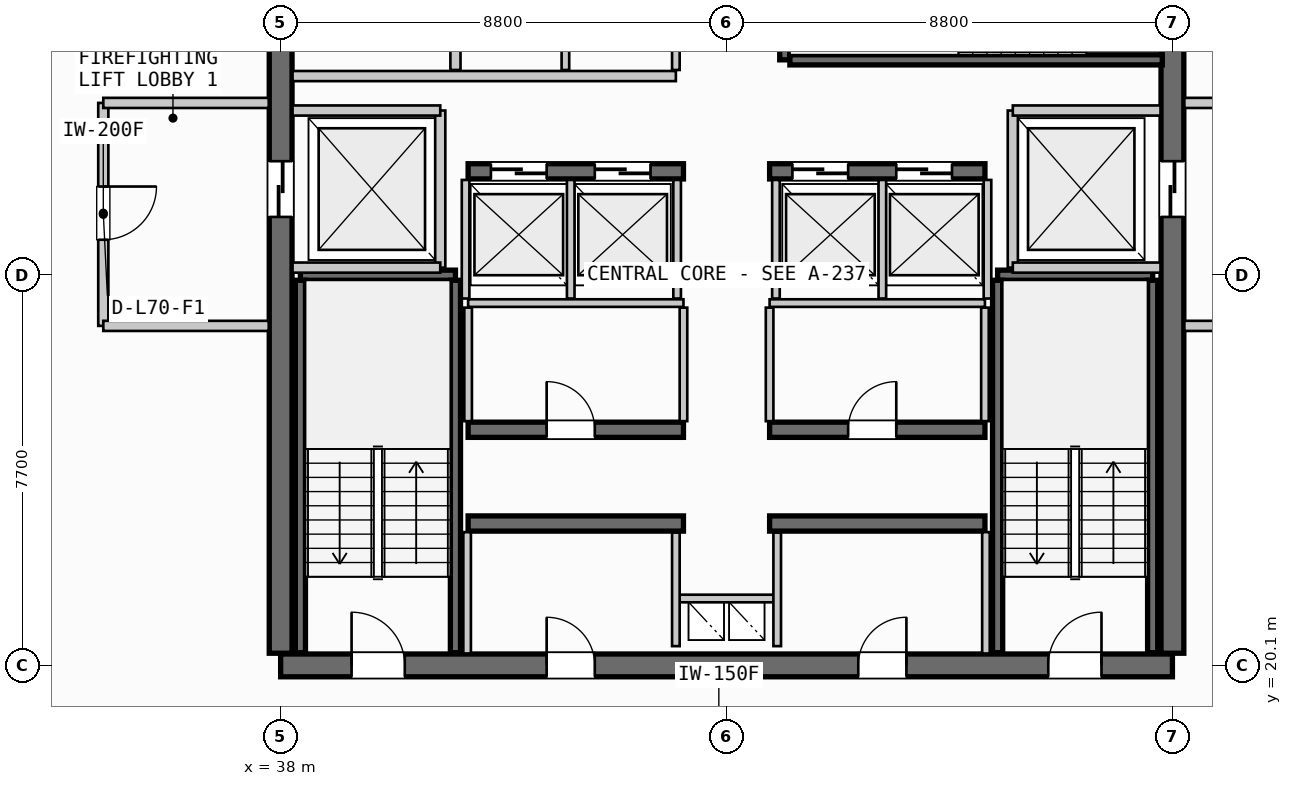
"""IFC4 building model, lengths in metres.
Left out: names, types, materials, properties, quantities, classifications, styles, units other than length and angle.
Written with IfcOpenShell. Run it as: python <this file> out.ifc"""

import sys

from ifc_helpers import new_model, si_unit, direction, frame, frame_2d, origin, place, context, subcontext, project, spatial, rectangle, extrude, source, transform, mapped, element, fill, save


model = new_model("IFC4")
c1 = context("Model", 3, precision=1e-05, world=origin(), true_north=direction((0.0, 1.0)))
c2 = subcontext(c1, "Body", "Model", "MODEL_VIEW")
j1 = project(units=[si_unit("LENGTHUNIT", "METRE"), si_unit("PLANEANGLEUNIT", "RADIAN")], contexts=[c1])
p1 = place(None, origin())
s1 = spatial("IfcSite", under=j1, at=p1, CompositionType="ELEMENT")
p2 = place(p1, origin())
s2 = spatial("IfcBuilding", under=s1, at=p2, CompositionType="ELEMENT")
p3 = place(p2, frame((0.0, 0.0, 266.35)))
s3 = spatial("IfcBuildingStorey", under=s2, at=p3, CompositionType="ELEMENT", Elevation=266.35)
p4 = place(p3, frame((38.0, 20.1, 0.0), z_axis=(0.0, 0.0, 1.0), x_axis=(1.0, 0.0, 0.0)))
e1 = element("IfcWall", 1, at=p4, inside=s3, PredefinedType="SHEAR", context=c2, shape_type="SweptSolid", body=[
    extrude(rectangle(XDim=17.6, YDim=0.45, at=frame_2d((8.8, 0.0))), origin(), (0.0, 0.0, 1.0), 3.21),
])
p5 = place(p4, frame((1.4, 0.0, 0.0)))
e2 = element("IfcOpeningElement", 2, at=p5, cuts=e1, PredefinedType="OPENING", context=c2, shape_type="SweptSolid", body=[
    extrude(rectangle(XDim=1.05, YDim=2.15, at=frame_2d((0.525, 1.075))), frame((0.0, 0.235, 0.0), z_axis=(0.0, -1.0, 0.0), x_axis=(1.0, 0.0, 0.0)), (0.0, 0.0, 1.0), 0.47),
])
p6 = place(p4, frame((15.15, 0.0, 0.0)))
e3 = element("IfcOpeningElement", 3, at=p6, cuts=e1, PredefinedType="OPENING", context=c2, shape_type="SweptSolid", body=[
    extrude(rectangle(XDim=1.05, YDim=2.15, at=frame_2d((0.525, 1.075))), frame((0.0, 0.235, 0.0), z_axis=(0.0, -1.0, 0.0), x_axis=(1.0, 0.0, 0.0)), (0.0, 0.0, 1.0), 0.47),
])
p7 = place(p4, frame((5.25, 0.0, 0.0)))
e4 = element("IfcOpeningElement", 4, at=p7, cuts=e1, PredefinedType="OPENING", context=c2, shape_type="SweptSolid", body=[
    extrude(rectangle(XDim=0.95, YDim=2.15, at=frame_2d((0.475, 1.075))), frame((0.0, 0.235, 0.0), z_axis=(0.0, -1.0, 0.0), x_axis=(1.0, 0.0, 0.0)), (0.0, 0.0, 1.0), 0.47),
])
p8 = place(p4, frame((11.4, 0.0, 0.0)))
e5 = element("IfcOpeningElement", 5, at=p8, cuts=e1, PredefinedType="OPENING", context=c2, shape_type="SweptSolid", body=[
    extrude(rectangle(XDim=0.95, YDim=2.15, at=frame_2d((0.475, 1.075))), frame((0.0, 0.235, 0.0), z_axis=(0.0, -1.0, 0.0), x_axis=(1.0, 0.0, 0.0)), (0.0, 0.0, 1.0), 0.47),
])
p9 = place(p3, frame((38.0, 35.26, 0.0), z_axis=(0.0, 0.0, 1.0), x_axis=(0.0, -1.0, 0.0)))
e6 = element("IfcWall", 6, at=p9, inside=s3, PredefinedType="SHEAR", context=c2, shape_type="SweptSolid", body=[
    extrude(rectangle(XDim=14.92, YDim=0.45, at=frame_2d((7.46, 0.0))), origin(), (0.0, 0.0, 1.0), 3.21),
])
p10 = place(p9, frame((5.21, 0.0, 0.0)))
e7 = element("IfcOpeningElement", 7, at=p10, cuts=e6, PredefinedType="OPENING", context=c2, shape_type="SweptSolid", body=[
    extrude(rectangle(XDim=1.1, YDim=2.2, at=frame_2d((0.55, 1.1))), frame((0.0, 0.235, 0.0), z_axis=(0.0, -1.0, 0.0), x_axis=(1.0, 0.0, 0.0)), (0.0, 0.0, 1.0), 0.47),
])
p11 = place(p3, frame((55.6, 20.34, 0.0), z_axis=(0.0, 0.0, 1.0), x_axis=(0.0, 1.0, 0.0)))
e8 = element("IfcWall", 8, at=p11, inside=s3, PredefinedType="SHEAR", context=c2, shape_type="SweptSolid", body=[
    extrude(rectangle(XDim=14.92, YDim=0.45, at=frame_2d((7.46, 0.0))), origin(), (0.0, 0.0, 1.0), 3.21),
])
p12 = place(p11, frame((12.71, 0.0, 0.0)))
e9 = element("IfcOpeningElement", 9, at=p12, cuts=e8, PredefinedType="OPENING", context=c2, shape_type="SweptSolid", body=[
    extrude(rectangle(XDim=1.05, YDim=2.15, at=frame_2d((0.525, 1.075))), frame((0.0, 0.235, 0.0), z_axis=(0.0, -1.0, 0.0), x_axis=(1.0, 0.0, 0.0)), (0.0, 0.0, 1.0), 0.47),
])
p13 = place(p11, frame((8.61, 0.0, 0.0)))
e10 = element("IfcOpeningElement", 10, at=p13, cuts=e8, PredefinedType="OPENING", context=c2, shape_type="SweptSolid", body=[
    extrude(rectangle(XDim=1.1, YDim=2.2, at=frame_2d((0.55, 1.1))), frame((0.0, 0.235, 0.0), z_axis=(0.0, -1.0, 0.0), x_axis=(1.0, 0.0, 0.0)), (0.0, 0.0, 1.0), 0.47),
])
for number, where, z_axis, x_axis in (
    (11, (41.7, 22.9, 0.0), (0.0, 0.0, 1.0), (1.0, 0.0, 0.0)),
    (12, (47.65, 22.9, 0.0), (0.0, 0.0, 1.0), (1.0, 0.0, 0.0)),
):
    element("IfcWall", number, at=place(p3, frame(where, z_axis=z_axis, x_axis=x_axis)), inside=s3, PredefinedType="SHEAR", context=c2, shape_type="SweptSolid", body=[
        extrude(rectangle(XDim=4.25, YDim=0.3, at=frame_2d((2.125, 0.0))), origin(), (0.0, 0.0, 1.0), 3.21),
    ])
p14 = place(p3, frame((41.7, 24.75, 0.0), z_axis=(0.0, 0.0, 1.0), x_axis=(1.0, 0.0, 0.0)))
e13 = element("IfcWall", 13, at=p14, inside=s3, PredefinedType="SHEAR", context=c2, shape_type="SweptSolid", body=[
    extrude(rectangle(XDim=4.25, YDim=0.3, at=frame_2d((2.125, 0.0))), origin(), (0.0, 0.0, 1.0), 3.21),
])
p15 = place(p14, frame((1.55, 0.0, 0.0)))
e14 = element("IfcOpeningElement", 14, at=p15, cuts=e13, PredefinedType="OPENING", context=c2, shape_type="SweptSolid", body=[
    extrude(rectangle(XDim=0.95, YDim=2.15, at=frame_2d((0.475, 1.075))), frame((0.0, 0.16, 0.0), z_axis=(0.0, -1.0, 0.0), x_axis=(1.0, 0.0, 0.0)), (0.0, 0.0, 1.0), 0.32),
])
p16 = place(p3, frame((47.65, 24.75, 0.0), z_axis=(0.0, 0.0, 1.0), x_axis=(1.0, 0.0, 0.0)))
e15 = element("IfcWall", 15, at=p16, inside=s3, PredefinedType="SHEAR", context=c2, shape_type="SweptSolid", body=[
    extrude(rectangle(XDim=4.25, YDim=0.3, at=frame_2d((2.125, 0.0))), origin(), (0.0, 0.0, 1.0), 3.21),
])
p17 = place(p16, frame((1.55, 0.0, 0.0)))
e16 = element("IfcOpeningElement", 16, at=p17, cuts=e15, PredefinedType="OPENING", context=c2, shape_type="SweptSolid", body=[
    extrude(rectangle(XDim=0.95, YDim=2.15, at=frame_2d((0.475, 1.075))), frame((0.0, 0.16, 0.0), z_axis=(0.0, -1.0, 0.0), x_axis=(1.0, 0.0, 0.0)), (0.0, 0.0, 1.0), 0.32),
])
p18 = place(p3, frame((41.7, 29.85, 0.0), z_axis=(0.0, 0.0, 1.0), x_axis=(1.0, 0.0, 0.0)))
e17 = element("IfcWall", 17, at=p18, inside=s3, PredefinedType="SHEAR", context=c2, shape_type="SweptSolid", body=[
    extrude(rectangle(XDim=4.25, YDim=0.3, at=frame_2d((2.125, 0.0))), origin(), (0.0, 0.0, 1.0), 3.21),
])
p19 = place(p18, frame((0.45, 0.0, 0.0)))
e18 = element("IfcOpeningElement", 18, at=p19, cuts=e17, PredefinedType="OPENING", context=c2, shape_type="SweptSolid", body=[
    extrude(rectangle(XDim=1.1, YDim=2.2, at=frame_2d((0.55, 1.1))), frame((0.0, 0.16, 0.0), z_axis=(0.0, -1.0, 0.0), x_axis=(1.0, 0.0, 0.0)), (0.0, 0.0, 1.0), 0.32),
])
p20 = place(p18, frame((2.5, 0.0, 0.0)))
e19 = element("IfcOpeningElement", 19, at=p20, cuts=e17, PredefinedType="OPENING", context=c2, shape_type="SweptSolid", body=[
    extrude(rectangle(XDim=1.1, YDim=2.2, at=frame_2d((0.55, 1.1))), frame((0.0, 0.16, 0.0), z_axis=(0.0, -1.0, 0.0), x_axis=(1.0, 0.0, 0.0)), (0.0, 0.0, 1.0), 0.32),
])
p21 = place(p3, frame((47.65, 29.85, 0.0), z_axis=(0.0, 0.0, 1.0), x_axis=(1.0, 0.0, 0.0)))
e20 = element("IfcWall", 20, at=p21, inside=s3, PredefinedType="SHEAR", context=c2, shape_type="SweptSolid", body=[
    extrude(rectangle(XDim=4.25, YDim=0.3, at=frame_2d((2.125, 0.0))), origin(), (0.0, 0.0, 1.0), 3.21),
])
p22 = place(p21, frame((0.45, 0.0, 0.0)))
e21 = element("IfcOpeningElement", 21, at=p22, cuts=e20, PredefinedType="OPENING", context=c2, shape_type="SweptSolid", body=[
    extrude(rectangle(XDim=1.1, YDim=2.2, at=frame_2d((0.55, 1.1))), frame((0.0, 0.16, 0.0), z_axis=(0.0, -1.0, 0.0), x_axis=(1.0, 0.0, 0.0)), (0.0, 0.0, 1.0), 0.32),
])
p23 = place(p21, frame((2.5, 0.0, 0.0)))
e22 = element("IfcOpeningElement", 22, at=p23, cuts=e20, PredefinedType="OPENING", context=c2, shape_type="SweptSolid", body=[
    extrude(rectangle(XDim=1.1, YDim=2.2, at=frame_2d((0.55, 1.1))), frame((0.0, 0.16, 0.0), z_axis=(0.0, -1.0, 0.0), x_axis=(1.0, 0.0, 0.0)), (0.0, 0.0, 1.0), 0.32),
])
p24 = place(p3, frame((38.39, 27.8, 0.0), z_axis=(0.0, 0.0, 1.0), x_axis=(1.0, 0.0, 0.0)))
e23 = element("IfcWall", 23, at=p24, inside=s3, PredefinedType="SHEAR", context=c2, shape_type="SweptSolid", body=[
    extrude(rectangle(XDim=3.06, YDim=0.2, at=frame_2d((1.53, 0.0))), origin(), (0.0, 0.0, 1.0), 3.21),
])
for number, where, z_axis, x_axis in (
    (24, (41.45, 27.7, 0.0), (0.0, 0.0, 1.0), (0.0, -1.0, 0.0)),
    (25, (38.39, 20.35, 0.0), (0.0, 0.0, 1.0), (0.0, 1.0, 0.0)),
):
    element("IfcWall", number, at=place(p3, frame(where, z_axis=z_axis, x_axis=x_axis)), inside=s3, PredefinedType="SHEAR", context=c2, shape_type="SweptSolid", body=[
        extrude(rectangle(XDim=7.35, YDim=0.2, at=frame_2d((3.675, 0.0))), origin(), (0.0, 0.0, 1.0), 3.21),
    ])
p25 = place(p3, frame((52.15, 27.8, 0.0), z_axis=(0.0, 0.0, 1.0), x_axis=(1.0, 0.0, 0.0)))
e26 = element("IfcWall", 26, at=p25, inside=s3, PredefinedType="SHEAR", context=c2, shape_type="SweptSolid", body=[
    extrude(rectangle(XDim=3.06, YDim=0.2, at=frame_2d((1.53, 0.0))), origin(), (0.0, 0.0, 1.0), 3.21),
])
for number, where, z_axis, x_axis in (
    (27, (55.21, 27.7, 0.0), (0.0, 0.0, 1.0), (0.0, -1.0, 0.0)),
    (28, (52.15, 20.35, 0.0), (0.0, 0.0, 1.0), (0.0, 1.0, 0.0)),
):
    element("IfcWall", number, at=place(p3, frame(where, z_axis=z_axis, x_axis=x_axis)), inside=s3, PredefinedType="SHEAR", context=c2, shape_type="SweptSolid", body=[
        extrude(rectangle(XDim=7.35, YDim=0.2, at=frame_2d((3.675, 0.0))), origin(), (0.0, 0.0, 1.0), 3.21),
    ])
p26 = place(p3, frame((47.95, 32.05, 0.0), z_axis=(0.0, 0.0, 1.0), x_axis=(0.0, 1.0, 0.0)))
e29 = element("IfcWall", 29, at=p26, inside=s3, PredefinedType="SHEAR", context=c2, shape_type="SweptSolid", body=[
    extrude(rectangle(XDim=3.06, YDim=0.2, at=frame_2d((1.53, 0.0))), origin(), (0.0, 0.0, 1.0), 3.21),
])
p27 = place(p3, frame((55.4, 32.05, 0.0), z_axis=(0.0, 0.0, 1.0), x_axis=(-1.0, 0.0, 0.0)))
e30 = element("IfcWall", 30, at=p27, inside=s3, PredefinedType="SHEAR", context=c2, shape_type="SweptSolid", body=[
    extrude(rectangle(XDim=7.35, YDim=0.2, at=frame_2d((3.675, 0.0))), origin(), (0.0, 0.0, 1.0), 3.21),
])
p28 = place(p3, frame((45.8, 21.42, 0.0), z_axis=(0.0, 0.0, 1.0), x_axis=(1.0, 0.0, 0.0)))
e31 = element("IfcWall", 31, at=p28, inside=s3, PredefinedType="PARTITIONING", context=c2, shape_type="SweptSolid", body=[
    extrude(rectangle(XDim=2.0, YDim=0.15, at=frame_2d((1.0, 0.0))), origin(), (0.0, 0.0, 1.0), 2.595),
])
for number, where, z_axis, x_axis in (
    (32, (45.8, 20.48, 0.0), (0.0, 0.0, 1.0), (0.0, 1.0, 0.0)),
    (33, (47.8, 20.48, 0.0), (0.0, 0.0, 1.0), (0.0, 1.0, 0.0)),
):
    element("IfcWall", number, at=place(p3, frame(where, z_axis=z_axis, x_axis=x_axis)), inside=s3, PredefinedType="PARTITIONING", context=c2, shape_type="SweptSolid", body=[
        extrude(rectangle(XDim=2.24, YDim=0.15, at=frame_2d((1.12, 0.0))), origin(), (0.0, 0.0, 1.0), 2.595),
    ])
p29 = place(p3, frame((41.15, 27.95, 0.0), z_axis=(0.0, 0.0, 1.0), x_axis=(0.0, 1.0, 0.0)))
e34 = element("IfcWall", 34, at=p29, inside=s3, PredefinedType="PARTITIONING", context=c2, shape_type="SweptSolid", body=[
    extrude(rectangle(XDim=3.1, YDim=0.2, at=frame_2d((1.55, 0.0))), origin(), (0.0, 0.0, 1.0), 2.595),
])
for number, where, z_axis, x_axis in (
    (35, (38.235, 27.95, 0.0), (0.0, 0.0, 1.0), (1.0, 0.0, 0.0)),
    (36, (38.235, 31.05, 0.0), (0.0, 0.0, 1.0), (1.0, 0.0, 0.0)),
):
    element("IfcWall", number, at=place(p3, frame(where, z_axis=z_axis, x_axis=x_axis)), inside=s3, PredefinedType="PARTITIONING", context=c2, shape_type="SweptSolid", body=[
        extrude(rectangle(XDim=2.915, YDim=0.2, at=frame_2d((1.458, 0.0))), origin(), (0.0, 0.0, 1.0), 2.595),
    ])
p30 = place(p3, frame((34.5, 31.2, 0.0), z_axis=(0.0, 0.0, 1.0), x_axis=(0.0, -1.0, 0.0)))
e37 = element("IfcWall", 37, at=p30, inside=s3, PredefinedType="PARTITIONING", context=c2, shape_type="SweptSolid", body=[
    extrude(rectangle(XDim=4.4, YDim=0.2, at=frame_2d((2.2, 0.0))), origin(), (0.0, 0.0, 1.0), 2.595),
])
p31 = place(p30, frame((1.65, 0.0, 0.0)))
e38 = element("IfcOpeningElement", 38, at=p31, cuts=e37, PredefinedType="OPENING", context=c2, shape_type="SweptSolid", body=[
    extrude(rectangle(XDim=1.05, YDim=2.15, at=frame_2d((0.525, 1.075))), frame((0.0, 0.11, 0.0), z_axis=(0.0, -1.0, 0.0), x_axis=(1.0, 0.0, 0.0)), (0.0, 0.0, 1.0), 0.22),
])
for number, where, z_axis, x_axis in (
    (39, (34.5, 26.8, 0.0), (0.0, 0.0, 1.0), (1.0, 0.0, 0.0)),
    (40, (34.5, 31.2, 0.0), (0.0, 0.0, 1.0), (1.0, 0.0, 0.0)),
):
    element("IfcWall", number, at=place(p3, frame(where, z_axis=z_axis, x_axis=x_axis)), inside=s3, PredefinedType="PARTITIONING", context=c2, shape_type="SweptSolid", body=[
        extrude(rectangle(XDim=3.265, YDim=0.2, at=frame_2d((1.632, 0.0))), origin(), (0.0, 0.0, 1.0), 2.595),
    ])
p32 = place(p3, frame((52.45, 27.95, 0.0), z_axis=(0.0, 0.0, 1.0), x_axis=(0.0, 1.0, 0.0)))
e41 = element("IfcWall", 41, at=p32, inside=s3, PredefinedType="PARTITIONING", context=c2, shape_type="SweptSolid", body=[
    extrude(rectangle(XDim=3.1, YDim=0.2, at=frame_2d((1.55, 0.0))), origin(), (0.0, 0.0, 1.0), 2.595),
])
for number, where, z_axis, x_axis in (
    (42, (52.45, 27.95, 0.0), (0.0, 0.0, 1.0), (1.0, 0.0, 0.0)),
    (43, (52.45, 31.05, 0.0), (0.0, 0.0, 1.0), (1.0, 0.0, 0.0)),
):
    element("IfcWall", number, at=place(p3, frame(where, z_axis=z_axis, x_axis=x_axis)), inside=s3, PredefinedType="PARTITIONING", context=c2, shape_type="SweptSolid", body=[
        extrude(rectangle(XDim=2.915, YDim=0.2, at=frame_2d((1.458, 0.0))), origin(), (0.0, 0.0, 1.0), 2.595),
    ])
for number, where, z_axis, x_axis in (
    (44, (55.835, 26.8, 0.0), (0.0, 0.0, 1.0), (1.0, 0.0, 0.0)),
    (45, (55.835, 31.2, 0.0), (0.0, 0.0, 1.0), (1.0, 0.0, 0.0)),
):
    element("IfcWall", number, at=place(p3, frame(where, z_axis=z_axis, x_axis=x_axis)), inside=s3, PredefinedType="PARTITIONING", context=c2, shape_type="SweptSolid", body=[
        extrude(rectangle(XDim=3.265, YDim=0.2, at=frame_2d((1.633, 0.0))), origin(), (0.0, 0.0, 1.0), 2.595),
    ])
for number, where, z_axis, x_axis in (
    (46, (41.68, 20.335, 0.0), (0.0, 0.0, 1.0), (0.0, 1.0, 0.0)),
    (47, (51.92, 20.335, 0.0), (0.0, 0.0, 1.0), (0.0, 1.0, 0.0)),
):
    element("IfcWall", number, at=place(p3, frame(where, z_axis=z_axis, x_axis=x_axis)), inside=s3, PredefinedType="PARTITIONING", context=c2, shape_type="SweptSolid", body=[
        extrude(rectangle(XDim=2.395, YDim=0.15, at=frame_2d((1.198, 0.0))), origin(), (0.0, 0.0, 1.0), 2.595),
    ])
for number, where, z_axis, x_axis in (
    (48, (41.7, 27.25, 0.0), (0.0, 0.0, 1.0), (1.0, 0.0, 0.0)),
    (49, (47.65, 27.25, 0.0), (0.0, 0.0, 1.0), (1.0, 0.0, 0.0)),
):
    element("IfcWall", number, at=place(p3, frame(where, z_axis=z_axis, x_axis=x_axis)), inside=s3, PredefinedType="PARTITIONING", context=c2, shape_type="SweptSolid", body=[
        extrude(rectangle(XDim=4.25, YDim=0.15, at=frame_2d((2.125, 0.0))), origin(), (0.0, 0.0, 1.0), 2.595),
    ])
for number, where, z_axis, x_axis in (
    (50, (41.7, 24.92, 0.0), (0.0, 0.0, 1.0), (0.0, 1.0, 0.0)),
    (51, (45.95, 24.92, 0.0), (0.0, 0.0, 1.0), (0.0, 1.0, 0.0)),
    (52, (47.65, 24.92, 0.0), (0.0, 0.0, 1.0), (0.0, 1.0, 0.0)),
    (53, (51.9, 24.92, 0.0), (0.0, 0.0, 1.0), (0.0, 1.0, 0.0)),
):
    element("IfcWall", number, at=place(p3, frame(where, z_axis=z_axis, x_axis=x_axis)), inside=s3, PredefinedType="PARTITIONING", context=c2, shape_type="SweptSolid", body=[
        extrude(rectangle(XDim=2.24, YDim=0.15, at=frame_2d((1.12, 0.0))), origin(), (0.0, 0.0, 1.0), 2.595),
    ])
for number, where, z_axis, x_axis in (
    (54, (41.65, 27.34, 0.0), (0.0, 0.0, 1.0), (0.0, 1.0, 0.0)),
    (55, (43.725, 27.34, 0.0), (0.0, 0.0, 1.0), (0.0, 1.0, 0.0)),
    (56, (45.825, 27.34, 0.0), (0.0, 0.0, 1.0), (0.0, 1.0, 0.0)),
    (57, (47.775, 27.34, 0.0), (0.0, 0.0, 1.0), (0.0, 1.0, 0.0)),
    (58, (49.875, 27.34, 0.0), (0.0, 0.0, 1.0), (0.0, 1.0, 0.0)),
    (59, (51.95, 27.34, 0.0), (0.0, 0.0, 1.0), (0.0, 1.0, 0.0)),
):
    element("IfcWall", number, at=place(p3, frame(where, z_axis=z_axis, x_axis=x_axis)), inside=s3, PredefinedType="PARTITIONING", context=c2, shape_type="SweptSolid", body=[
        extrude(rectangle(XDim=2.34, YDim=0.15, at=frame_2d((1.17, 0.0))), origin(), (0.0, 0.0, 1.0), 2.595),
    ])
p33 = place(p3, frame((41.45, 31.85, 0.0), z_axis=(0.0, 0.0, 1.0), x_axis=(0.0, 1.0, 0.0)))
e60 = element("IfcWall", 60, at=p33, inside=s3, PredefinedType="PARTITIONING", context=c2, shape_type="SweptSolid", body=[
    extrude(rectangle(XDim=3.415, YDim=0.2, at=frame_2d((1.708, 0.0))), origin(), (0.0, 0.0, 1.0), 2.595),
])
p34 = place(p3, frame((38.235, 31.73, 0.0), z_axis=(0.0, 0.0, 1.0), x_axis=(1.0, 0.0, 0.0)))
e61 = element("IfcWall", 61, at=p34, inside=s3, PredefinedType="PARTITIONING", context=c2, shape_type="SweptSolid", body=[
    extrude(rectangle(XDim=7.565, YDim=0.2, at=frame_2d((3.782, 0.0))), origin(), (0.0, 0.0, 1.0), 2.595),
])
p35 = place(p3, frame((45.8, 31.85, 0.0), z_axis=(0.0, 0.0, 1.0), x_axis=(0.0, 1.0, 0.0)))
e62 = element("IfcWall", 62, at=p35, inside=s3, PredefinedType="PARTITIONING", context=c2, shape_type="SweptSolid", body=[
    extrude(rectangle(XDim=3.415, YDim=0.15, at=frame_2d((1.708, 0.0))), origin(), (0.0, 0.0, 1.0), 2.595),
])
p36 = place(p3, frame((43.62, 31.85, 0.0), z_axis=(0.0, 0.0, 1.0), x_axis=(0.0, 1.0, 0.0)))
e63 = element("IfcWall", 63, at=p36, inside=s3, PredefinedType="PLUMBINGWALL", context=c2, shape_type="SweptSolid", body=[
    extrude(rectangle(XDim=3.415, YDim=0.15, at=frame_2d((1.708, 0.0))), origin(), (0.0, 0.0, 1.0), 2.595),
])
m1 = source(origin(), c2, "Body", "SweptSolid", [
    extrude(rectangle(XDim=1.05, YDim=2.15, at=frame_2d((0.525, 1.075))), frame((0.0, 0.025, 0.0), z_axis=(0.0, -1.0, 0.0), x_axis=(1.0, 0.0, 0.0)), (0.0, 0.0, 1.0), 0.05),
])
p37 = place(p5, origin())
e64 = element("IfcDoor", 64, at=p37, inside=s3, OperationType="SINGLE_SWING_LEFT", PredefinedType="DOOR", context=c2, shape_type="MappedRepresentation", body=[
    mapped(m1, transform((0.0, 0.0, 0.0), scale=1.0)),
])
fill(e2, e64)
p38 = place(p6, origin())
e65 = element("IfcDoor", 65, at=p38, inside=s3, OperationType="SINGLE_SWING_RIGHT", PredefinedType="DOOR", context=c2, shape_type="MappedRepresentation", body=[
    mapped(m1, transform((0.0, 0.0, 0.0), scale=1.0)),
])
fill(e3, e65)
m2 = source(origin(), c2, "Body", "SweptSolid", [
    extrude(rectangle(XDim=1.1, YDim=2.2, at=frame_2d((0.55, 1.1))), frame((0.0, 0.025, 0.0), z_axis=(0.0, -1.0, 0.0), x_axis=(1.0, 0.0, 0.0)), (0.0, 0.0, 1.0), 0.05),
])
p39 = place(p10, origin())
e66 = element("IfcDoor", 66, at=p39, inside=s3, OperationType="SLIDING_TO_LEFT", PredefinedType="DOOR", context=c2, shape_type="MappedRepresentation", body=[
    mapped(m2, transform((0.0, 0.0, 0.0), scale=1.0)),
])
fill(e7, e66)
p40 = place(p13, origin())
e67 = element("IfcDoor", 67, at=p40, inside=s3, OperationType="SLIDING_TO_RIGHT", PredefinedType="DOOR", context=c2, shape_type="MappedRepresentation", body=[
    mapped(m2, transform((0.0, 0.0, 0.0), scale=1.0)),
])
fill(e10, e67)
m3 = source(origin(), c2, "Body", "SweptSolid", [
    extrude(rectangle(XDim=0.95, YDim=2.15, at=frame_2d((0.475, 1.075))), frame((0.0, 0.025, 0.0), z_axis=(0.0, -1.0, 0.0), x_axis=(1.0, 0.0, 0.0)), (0.0, 0.0, 1.0), 0.05),
])
p41 = place(p7, origin())
e68 = element("IfcDoor", 68, at=p41, inside=s3, OperationType="SINGLE_SWING_LEFT", PredefinedType="DOOR", context=c2, shape_type="MappedRepresentation", body=[
    mapped(m3, transform((0.0, 0.0, 0.0), scale=1.0)),
])
fill(e4, e68)
p42 = place(p8, origin())
e69 = element("IfcDoor", 69, at=p42, inside=s3, OperationType="SINGLE_SWING_RIGHT", PredefinedType="DOOR", context=c2, shape_type="MappedRepresentation", body=[
    mapped(m3, transform((0.0, 0.0, 0.0), scale=1.0)),
])
fill(e5, e69)
p43 = place(p15, origin())
e70 = element("IfcDoor", 70, at=p43, inside=s3, OperationType="SINGLE_SWING_LEFT", PredefinedType="DOOR", context=c2, shape_type="MappedRepresentation", body=[
    mapped(m3, transform((0.0, 0.0, 0.0), scale=1.0)),
])
fill(e14, e70)
p44 = place(p17, origin())
e71 = element("IfcDoor", 71, at=p44, inside=s3, OperationType="SINGLE_SWING_RIGHT", PredefinedType="DOOR", context=c2, shape_type="MappedRepresentation", body=[
    mapped(m3, transform((0.0, 0.0, 0.0), scale=1.0)),
])
fill(e16, e71)
p45 = place(p19, origin())
e72 = element("IfcDoor", 72, at=p45, inside=s3, OperationType="SLIDING_TO_LEFT", PredefinedType="DOOR", context=c2, shape_type="MappedRepresentation", body=[
    mapped(m2, transform((0.0, 0.0, 0.0), scale=1.0)),
])
fill(e18, e72)
p46 = place(p20, origin())
e73 = element("IfcDoor", 73, at=p46, inside=s3, OperationType="SLIDING_TO_LEFT", PredefinedType="DOOR", context=c2, shape_type="MappedRepresentation", body=[
    mapped(m2, transform((0.0, 0.0, 0.0), scale=1.0)),
])
fill(e19, e73)
p47 = place(p22, origin())
e74 = element("IfcDoor", 74, at=p47, inside=s3, OperationType="SLIDING_TO_LEFT", PredefinedType="DOOR", context=c2, shape_type="MappedRepresentation", body=[
    mapped(m2, transform((0.0, 0.0, 0.0), scale=1.0)),
])
fill(e21, e74)
p48 = place(p23, origin())
e75 = element("IfcDoor", 75, at=p48, inside=s3, OperationType="SLIDING_TO_LEFT", PredefinedType="DOOR", context=c2, shape_type="MappedRepresentation", body=[
    mapped(m2, transform((0.0, 0.0, 0.0), scale=1.0)),
])
fill(e22, e75)
p49 = place(p31, origin())
e76 = element("IfcDoor", 76, at=p49, inside=s3, OperationType="SINGLE_SWING_LEFT", PredefinedType="DOOR", context=c2, shape_type="MappedRepresentation", body=[
    mapped(m1, transform((0.0, 0.0, 0.0), scale=1.0)),
])
fill(e38, e76)
save(model, sys.argv[1])
